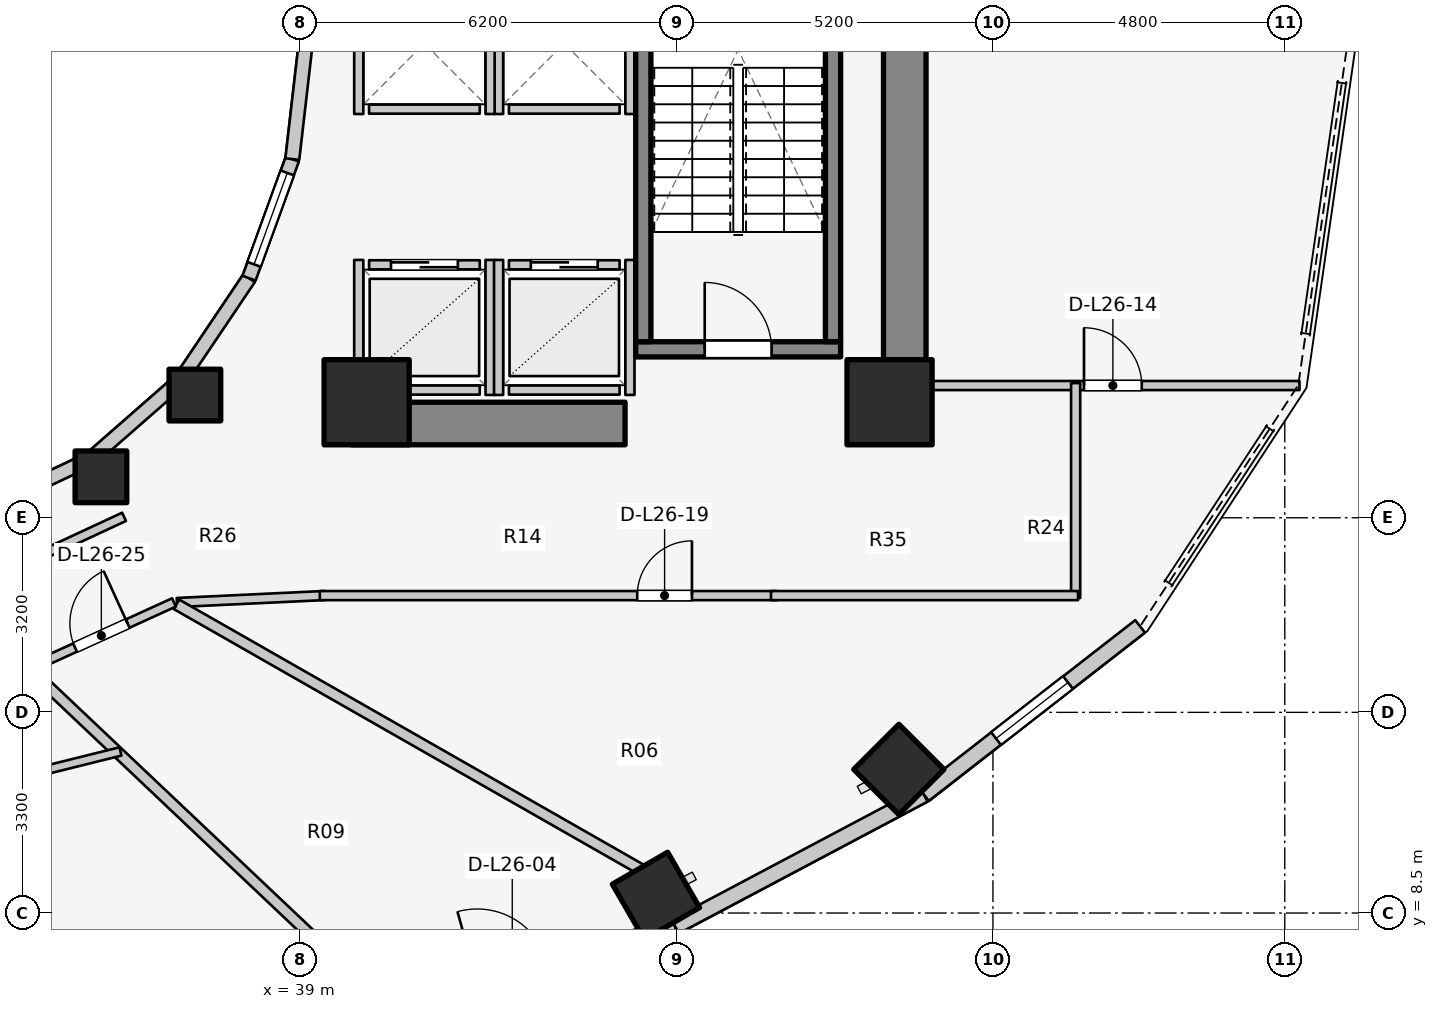
"""IFC4 building model, lengths in metres.
Left out: names, types, materials, properties, quantities, classifications, styles, units other than length and angle.
Written with IfcOpenShell. Run it as: python <this file> out.ifc"""

import sys

from ifc_helpers import new_model, si_unit, direction, frame, frame_2d, origin, origin_2d, place, context, subcontext, project, spatial, rectangle, extrude, element, fill, save


model = new_model("IFC4")
c1 = context("Model", 3, precision=1e-05, world=origin(), true_north=direction((0.0, 1.0)))
c2 = subcontext(c1, "Body", "Model", "MODEL_VIEW")
j1 = project(units=[si_unit("LENGTHUNIT", "METRE"), si_unit("PLANEANGLEUNIT", "RADIAN")], contexts=[c1])
p1 = place(None, origin())
s1 = spatial("IfcSite", under=j1, at=p1, CompositionType="ELEMENT")
p2 = place(p1, origin())
s2 = spatial("IfcBuilding", under=s1, at=p2, CompositionType="ELEMENT")
p3 = place(p2, frame((0.0, 0.0, 88.7)))
s3 = spatial("IfcBuildingStorey", under=s2, at=p3, CompositionType="ELEMENT", Elevation=88.7)
p4 = place(p3, frame((48.95, 17.05, 0.0), z_axis=(0.0, 0.0, 1.0), x_axis=(0.0, 1.0, 0.0)))
e1 = element("IfcWall", 1, at=p4, inside=s3, PredefinedType="SHEAR", context=c2, shape_type="SweptSolid", body=[
    extrude(rectangle(XDim=12.8, YDim=0.7, at=frame_2d((6.4, 0.0))), origin(), (0.0, 0.0, 1.0), 3.1),
])
p5 = place(p3, frame((39.85, 16.55, 0.0), z_axis=(0.0, 0.0, 1.0), x_axis=(1.0, 0.0, 0.0)))
e2 = element("IfcWall", 2, at=p5, inside=s3, PredefinedType="SHEAR", context=c2, shape_type="SweptSolid", body=[
    extrude(rectangle(XDim=4.5, YDim=0.7, at=frame_2d((2.25, 0.0))), origin(), (0.0, 0.0, 1.0), 3.1),
])
p6 = place(p3, frame((44.525, 17.77, 0.0), z_axis=(0.0, 0.0, 1.0), x_axis=(1.0, 0.0, 0.0)))
e3 = element("IfcWall", 3, at=p6, inside=s3, PredefinedType="SOLIDWALL", context=c2, shape_type="SweptSolid", body=[
    extrude(rectangle(XDim=3.37, YDim=0.25, at=frame_2d((1.685, 0.0))), origin(), (0.0, 0.0, 1.0), 3.1),
])
p7 = place(p6, frame((1.135, 0.0, 0.0)))
e4 = element("IfcOpeningElement", 4, at=p7, cuts=e3, PredefinedType="OPENING", context=c2, shape_type="SweptSolid", body=[
    extrude(rectangle(XDim=1.1, YDim=2.1, at=frame_2d((0.55, 1.05))), frame((0.0, 0.135, 0.0), z_axis=(0.0, -1.0, 0.0), x_axis=(1.0, 0.0, 0.0)), (0.0, 0.0, 1.0), 0.27),
])
for number, where, z_axis, x_axis in (
    (5, (44.65, 17.895, 0.0), (0.0, 0.0, 1.0), (0.0, 1.0, 0.0)),
    (6, (47.77, 17.895, 0.0), (0.0, 0.0, 1.0), (0.0, 1.0, 0.0)),
):
    element("IfcWall", number, at=place(p3, frame(where, z_axis=z_axis, x_axis=x_axis)), inside=s3, PredefinedType="SOLIDWALL", context=c2, shape_type="SweptSolid", body=[
        extrude(rectangle(XDim=7.81, YDim=0.25, at=frame_2d((3.905, 0.0))), origin(), (0.0, 0.0, 1.0), 3.1),
    ])
for number, where, z_axis, x_axis in (
    (7, (40.1, 16.9, 0.0), (0.0, 0.0, 1.0), (1.0, 0.0, 0.0)),
    (8, (48.7, 16.9, 0.0), (0.0, 0.0, 1.0), (1.0, 0.0, 0.0)),
):
    element("IfcColumn", number, at=place(p3, frame(where, z_axis=z_axis, x_axis=x_axis)), inside=s3, PredefinedType="COLUMN", context=c2, shape_type="SweptSolid", body=[
        extrude(rectangle(XDim=1.4, YDim=1.4, at=origin_2d()), origin(), (0.0, 0.0, 1.0), 3.1),
    ])
p8 = place(p3, frame((35.73, 15.673, 0.0), z_axis=(0.0, 0.0, 1.0), x_axis=(1.0, 0.0, 0.0)))
e9 = element("IfcColumn", 9, at=p8, inside=s3, PredefinedType="COLUMN", context=c2, shape_type="SweptSolid", body=[
    extrude(rectangle(XDim=0.85, YDim=0.85, at=origin_2d()), origin(), (0.0, 0.0, 1.0), 3.1),
])
p9 = place(p3, frame((44.858, 8.782, 0.0), z_axis=(0.0, 0.0, 1.0), x_axis=(0.5, -0.866025403784, 0.0)))
e10 = element("IfcColumn", 10, at=p9, inside=s3, PredefinedType="COLUMN", context=c2, shape_type="SweptSolid", body=[
    extrude(rectangle(XDim=1.05, YDim=1.05, at=origin_2d()), origin(), (0.0, 0.0, 1.0), 3.1),
])
p10 = place(p3, frame((37.275, 17.018, 0.0), z_axis=(0.0, 0.0, 1.0), x_axis=(1.0, 0.0, 0.0)))
e11 = element("IfcColumn", 11, at=p10, inside=s3, PredefinedType="COLUMN", context=c2, shape_type="SweptSolid", body=[
    extrude(rectangle(XDim=0.85, YDim=0.85, at=origin_2d()), origin(), (0.0, 0.0, 1.0), 3.1),
])
p11 = place(p3, frame((48.853, 10.862, 0.0), z_axis=(0.0, 0.0, 1.0), x_axis=(0.707106781187, -0.707106781187, 0.0)))
e12 = element("IfcColumn", 12, at=p11, inside=s3, PredefinedType="COLUMN", context=c2, shape_type="SweptSolid", body=[
    extrude(rectangle(XDim=1.05, YDim=1.05, at=origin_2d()), origin(), (0.0, 0.0, 1.0), 3.1),
])
p12 = place(p3, frame((33.843, 15.157, 0.0), z_axis=(0.0, 0.0, 1.0), x_axis=(0.904179699603, 0.427152280606, 0.0)))
e13 = element("IfcWall", 13, at=p12, inside=s3, PredefinedType="STANDARD", context=c2, shape_type="SweptSolid", body=[
    extrude(rectangle(XDim=1.899, YDim=0.23, at=frame_2d((0.95, 0.0))), origin(), (0.0, 0.0, 1.0), 2.16),
])
p13 = place(p3, frame((35.56, 15.968, 0.0), z_axis=(0.0, 0.0, 1.0), x_axis=(0.752576694707, 0.658504607869, 0.0)))
e14 = element("IfcWall", 14, at=p13, inside=s3, PredefinedType="STANDARD", context=c2, shape_type="SweptSolid", body=[
    extrude(rectangle(XDim=1.959, YDim=0.23, at=frame_2d((0.98, 0.0))), origin(), (0.0, 0.0, 1.0), 2.16),
])
p14 = place(p3, frame((37.035, 17.258, 0.0), z_axis=(0.0, 0.0, 1.0), x_axis=(0.558197800898, 0.829707909492, 0.0)))
e15 = element("IfcWall", 15, at=p14, inside=s3, PredefinedType="STANDARD", context=c2, shape_type="SweptSolid", body=[
    extrude(rectangle(XDim=2.027, YDim=0.23, at=frame_2d((1.013, 0.0))), origin(), (0.0, 0.0, 1.0), 2.16),
])
p15 = place(p3, frame((38.166, 18.94, 0.0), z_axis=(0.0, 0.0, 1.0), x_axis=(0.341423187295, 0.93990968033, 0.0)))
e16 = element("IfcWall", 16, at=p15, inside=s3, PredefinedType="STANDARD", context=c2, shape_type="SweptSolid", body=[
    extrude(rectangle(XDim=2.084, YDim=0.23, at=frame_2d((1.042, 0.0))), origin(), (0.0, 0.0, 1.0), 2.84),
])
p16 = place(p15, frame((0.242, 0.0, 0.85)))
e17 = element("IfcOpeningElement", 17, at=p16, cuts=e16, PredefinedType="OPENING", context=c2, shape_type="SweptSolid", body=[
    extrude(rectangle(XDim=1.6, YDim=1.65, at=frame_2d((0.8, 0.825))), frame((0.0, 0.125, 0.0), z_axis=(0.0, -1.0, 0.0), x_axis=(1.0, 0.0, 0.0)), (0.0, 0.0, 1.0), 0.25),
])
p17 = place(p3, frame((38.877, 20.898, 0.0), z_axis=(0.0, 0.0, 1.0), x_axis=(0.114711713601, 0.993398823617, 0.0)))
e18 = element("IfcWall", 18, at=p17, inside=s3, PredefinedType="STANDARD", context=c2, shape_type="SweptSolid", body=[
    extrude(rectangle(XDim=2.115, YDim=0.23, at=frame_2d((1.058, 0.0))), origin(), (0.0, 0.0, 1.0), 2.84),
])
p18 = place(p3, frame((39.816, 6.778, 0.0), z_axis=(0.0, 0.0, 1.0), x_axis=(0.962938491413, 0.269721081407, 0.0)))
e19 = element("IfcWall", 19, at=p18, inside=s3, PredefinedType="STANDARD", context=c2, shape_type="SweptSolid", body=[
    extrude(rectangle(XDim=5.563, YDim=0.26, at=frame_2d((2.782, 0.0))), origin(), (0.0, 0.0, 1.0), 2.88),
])
p19 = place(p18, frame((2.182, 0.0, 0.0)))
e20 = element("IfcOpeningElement", 20, at=p19, cuts=e19, PredefinedType="OPENING", context=c2, shape_type="SweptSolid", body=[
    extrude(rectangle(XDim=1.2, YDim=2.2, at=frame_2d((0.6, 1.1))), frame((0.0, 0.14, 0.0), z_axis=(0.0, -1.0, 0.0), x_axis=(1.0, 0.0, 0.0)), (0.0, 0.0, 1.0), 0.28),
])
p20 = place(p3, frame((45.173, 8.279, 0.0), z_axis=(0.0, 0.0, 1.0), x_axis=(0.883668636807, 0.4681129568, 0.0)))
e21 = element("IfcWall", 21, at=p20, inside=s3, PredefinedType="STANDARD", context=c2, shape_type="SweptSolid", body=[
    extrude(rectangle(XDim=4.631, YDim=0.26, at=frame_2d((2.316, 0.0))), origin(), (0.0, 0.0, 1.0), 2.85),
])
p21 = place(p3, frame((49.266, 10.447, 0.0), z_axis=(0.0, 0.0, 1.0), x_axis=(0.789127449954, 0.614229491094, 0.0)))
e22 = element("IfcWall", 22, at=p21, inside=s3, PredefinedType="STANDARD", context=c2, shape_type="SweptSolid", body=[
    extrude(rectangle(XDim=4.505, YDim=0.26, at=frame_2d((2.252, 0.0))), origin(), (0.0, 0.0, 1.0), 2.85),
])
p22 = place(p21, frame((1.502, 0.0, 0.75)))
e23 = element("IfcOpeningElement", 23, at=p22, cuts=e22, PredefinedType="OPENING", context=c2, shape_type="SweptSolid", body=[
    extrude(rectangle(XDim=1.5, YDim=1.6, at=frame_2d((0.75, 0.8))), frame((0.0, 0.14, 0.0), z_axis=(0.0, -1.0, 0.0), x_axis=(1.0, 0.0, 0.0)), (0.0, 0.0, 1.0), 0.28),
])
p23 = place(p3, frame((40.14, 19.16, 0.0), z_axis=(0.0, 0.0, 1.0), x_axis=(1.0, 0.0, 0.0)))
e24 = element("IfcWall", 24, at=p23, inside=s3, PredefinedType="SOLIDWALL", context=c2, shape_type="SweptSolid", body=[
    extrude(rectangle(XDim=1.82, YDim=0.15, at=frame_2d((0.91, 0.0))), origin(), (0.0, 0.0, 1.0), 2.12),
])
p24 = place(p23, frame((0.36, 0.0, 0.0)))
e25 = element("IfcOpeningElement", 25, at=p24, cuts=e24, PredefinedType="OPENING", context=c2, shape_type="SweptSolid", body=[
    extrude(rectangle(XDim=1.1, YDim=2.1, at=frame_2d((0.55, 1.05))), frame((0.0, 0.085, 0.0), z_axis=(0.0, -1.0, 0.0), x_axis=(1.0, 0.0, 0.0)), (0.0, 0.0, 1.0), 0.17),
])
p25 = place(p3, frame((40.14, 17.1, 0.0), z_axis=(0.0, 0.0, 1.0), x_axis=(1.0, 0.0, 0.0)))
e26 = element("IfcWall", 26, at=p25, inside=s3, PredefinedType="SOLIDWALL", context=c2, shape_type="SweptSolid", body=[
    extrude(rectangle(XDim=1.82, YDim=0.15, at=frame_2d((0.91, 0.0))), origin(), (0.0, 0.0, 1.0), 2.12),
])
p26 = place(p3, frame((39.97, 17.02, 0.0), z_axis=(0.0, 0.0, 1.0), x_axis=(0.0, 1.0, 0.0)))
e27 = element("IfcWall", 27, at=p26, inside=s3, PredefinedType="SOLIDWALL", context=c2, shape_type="SweptSolid", body=[
    extrude(rectangle(XDim=2.22, YDim=0.15, at=frame_2d((1.11, 0.0))), origin(), (0.0, 0.0, 1.0), 2.12),
])
p27 = place(p3, frame((42.13, 17.02, 0.0), z_axis=(0.0, 0.0, 1.0), x_axis=(0.0, 1.0, 0.0)))
e28 = element("IfcWall", 28, at=p27, inside=s3, PredefinedType="SOLIDWALL", context=c2, shape_type="SweptSolid", body=[
    extrude(rectangle(XDim=2.22, YDim=0.15, at=frame_2d((1.11, 0.0))), origin(), (0.0, 0.0, 1.0), 2.855),
])
p28 = place(p3, frame((42.44, 19.16, 0.0), z_axis=(0.0, 0.0, 1.0), x_axis=(1.0, 0.0, 0.0)))
e29 = element("IfcWall", 29, at=p28, inside=s3, PredefinedType="SOLIDWALL", context=c2, shape_type="SweptSolid", body=[
    extrude(rectangle(XDim=1.82, YDim=0.15, at=frame_2d((0.91, 0.0))), origin(), (0.0, 0.0, 1.0), 2.855),
])
p29 = place(p28, frame((0.36, 0.0, 0.0)))
e30 = element("IfcOpeningElement", 30, at=p29, cuts=e29, PredefinedType="OPENING", context=c2, shape_type="SweptSolid", body=[
    extrude(rectangle(XDim=1.1, YDim=2.1, at=frame_2d((0.55, 1.05))), frame((0.0, 0.085, 0.0), z_axis=(0.0, -1.0, 0.0), x_axis=(1.0, 0.0, 0.0)), (0.0, 0.0, 1.0), 0.17),
])
p30 = place(p3, frame((42.44, 17.1, 0.0), z_axis=(0.0, 0.0, 1.0), x_axis=(1.0, 0.0, 0.0)))
e31 = element("IfcWall", 31, at=p30, inside=s3, PredefinedType="SOLIDWALL", context=c2, shape_type="SweptSolid", body=[
    extrude(rectangle(XDim=1.82, YDim=0.15, at=frame_2d((0.91, 0.0))), origin(), (0.0, 0.0, 1.0), 2.855),
])
p31 = place(p3, frame((42.27, 17.02, 0.0), z_axis=(0.0, 0.0, 1.0), x_axis=(0.0, 1.0, 0.0)))
e32 = element("IfcWall", 32, at=p31, inside=s3, PredefinedType="SOLIDWALL", context=c2, shape_type="SweptSolid", body=[
    extrude(rectangle(XDim=2.22, YDim=0.15, at=frame_2d((1.11, 0.0))), origin(), (0.0, 0.0, 1.0), 2.855),
])
p32 = place(p3, frame((44.43, 17.02, 0.0), z_axis=(0.0, 0.0, 1.0), x_axis=(0.0, 1.0, 0.0)))
e33 = element("IfcWall", 33, at=p32, inside=s3, PredefinedType="SOLIDWALL", context=c2, shape_type="SweptSolid", body=[
    extrude(rectangle(XDim=2.22, YDim=0.15, at=frame_2d((1.11, 0.0))), origin(), (0.0, 0.0, 1.0), 2.12),
])
p33 = place(p3, frame((42.44, 21.72, 0.0), z_axis=(0.0, 0.0, 1.0), x_axis=(1.0, 0.0, 0.0)))
e34 = element("IfcWall", 34, at=p33, inside=s3, PredefinedType="SOLIDWALL", context=c2, shape_type="SweptSolid", body=[
    extrude(rectangle(XDim=1.82, YDim=0.15, at=frame_2d((0.91, 0.0))), origin(), (0.0, 0.0, 1.0), 2.855),
])
for number, where, z_axis, x_axis in (
    (35, (42.27, 21.64, 0.0), (0.0, 0.0, 1.0), (0.0, 1.0, 0.0)),
    (36, (44.43, 21.64, 0.0), (0.0, 0.0, 1.0), (0.0, 1.0, 0.0)),
):
    element("IfcWall", number, at=place(p3, frame(where, z_axis=z_axis, x_axis=x_axis)), inside=s3, PredefinedType="SOLIDWALL", context=c2, shape_type="SweptSolid", body=[
        extrude(rectangle(XDim=2.32, YDim=0.15, at=frame_2d((1.16, 0.0))), origin(), (0.0, 0.0, 1.0), 2.855),
    ])
p34 = place(p3, frame((40.14, 21.72, 0.0), z_axis=(0.0, 0.0, 1.0), x_axis=(1.0, 0.0, 0.0)))
e37 = element("IfcWall", 37, at=p34, inside=s3, PredefinedType="SOLIDWALL", context=c2, shape_type="SweptSolid", body=[
    extrude(rectangle(XDim=1.82, YDim=0.15, at=frame_2d((0.91, 0.0))), origin(), (0.0, 0.0, 1.0), 2.12),
])
p35 = place(p3, frame((39.97, 21.64, 0.0), z_axis=(0.0, 0.0, 1.0), x_axis=(0.0, 1.0, 0.0)))
e38 = element("IfcWall", 38, at=p35, inside=s3, PredefinedType="SOLIDWALL", context=c2, shape_type="SweptSolid", body=[
    extrude(rectangle(XDim=2.32, YDim=0.15, at=frame_2d((1.16, 0.0))), origin(), (0.0, 0.0, 1.0), 2.12),
])
p36 = place(p3, frame((42.13, 21.64, 0.0), z_axis=(0.0, 0.0, 1.0), x_axis=(0.0, 1.0, 0.0)))
e39 = element("IfcWall", 39, at=p36, inside=s3, PredefinedType="SOLIDWALL", context=c2, shape_type="SweptSolid", body=[
    extrude(rectangle(XDim=2.32, YDim=0.15, at=frame_2d((1.16, 0.0))), origin(), (0.0, 0.0, 1.0), 2.855),
])
p37 = place(p3, frame((34.127, 14.094, 0.0), z_axis=(0.0, 0.0, 1.0), x_axis=(0.906943449489, 0.421252393975, 0.0)))
e40 = element("IfcWall", 40, at=p37, inside=s3, PredefinedType="PARTITIONING", context=c2, shape_type="SweptSolid", body=[
    extrude(rectangle(XDim=2.186, YDim=0.15, at=frame_2d((1.093, 0.0))), origin(), (0.0, 0.0, 1.0), 2.272),
])
p38 = place(p3, frame((48.95, 17.175, 0.0), z_axis=(0.0, 0.0, 1.0), x_axis=(1.0, 0.0, 0.0)))
e41 = element("IfcWall", 41, at=p38, inside=s3, PredefinedType="PARTITIONING", context=c2, shape_type="SweptSolid", body=[
    extrude(rectangle(XDim=6.492, YDim=0.15, at=frame_2d((3.246, 0.0))), origin(), (0.0, 0.0, 1.0), 2.855),
])
p39 = place(p38, frame((2.948, 0.0, 0.0)))
e42 = element("IfcOpeningElement", 42, at=p39, cuts=e41, PredefinedType="OPENING", context=c2, shape_type="SweptSolid", body=[
    extrude(rectangle(XDim=0.95, YDim=2.1, at=frame_2d((0.475, 1.05))), frame((0.0, 0.085, 0.0), z_axis=(0.0, -1.0, 0.0), x_axis=(1.0, 0.0, 0.0)), (0.0, 0.0, 1.0), 0.17),
])
p40 = place(p3, frame((51.76, 13.68, 0.0), z_axis=(0.0, 0.0, 1.0), x_axis=(0.0, 1.0, 0.0)))
e43 = element("IfcWall", 43, at=p40, inside=s3, PredefinedType="PARTITIONING", context=c2, shape_type="SweptSolid", body=[
    extrude(rectangle(XDim=3.535, YDim=0.15, at=frame_2d((1.768, 0.0))), origin(), (0.0, 0.0, 1.0), 2.855),
])
p41 = place(p3, frame((36.98, 13.606, 0.0), z_axis=(0.0, 0.0, 1.0), x_axis=(0.998877427952, 0.047369651964, 0.0)))
e44 = element("IfcWall", 44, at=p41, inside=s3, PredefinedType="PARTITIONING", context=c2, shape_type="SweptSolid", body=[
    extrude(rectangle(XDim=2.433, YDim=0.15, at=frame_2d((1.216, 0.0))), origin(), (0.0, 0.0, 1.0), 2.272),
])
p42 = place(p3, frame((39.33, 13.72, 0.0), z_axis=(0.0, 0.0, 1.0), x_axis=(1.0, 0.0, 0.0)))
e45 = element("IfcWall", 45, at=p42, inside=s3, PredefinedType="PARTITIONING", context=c2, shape_type="SweptSolid", body=[
    extrude(rectangle(XDim=7.52, YDim=0.15, at=frame_2d((3.76, 0.0))), origin(), (0.0, 0.0, 1.0), 2.272),
])
p43 = place(p42, frame((5.22, 0.0, 0.0)))
e46 = element("IfcOpeningElement", 46, at=p43, cuts=e45, PredefinedType="OPENING", context=c2, shape_type="SweptSolid", body=[
    extrude(rectangle(XDim=0.9, YDim=2.1, at=frame_2d((0.45, 1.05))), frame((0.0, 0.085, 0.0), z_axis=(0.0, -1.0, 0.0), x_axis=(1.0, 0.0, 0.0)), (0.0, 0.0, 1.0), 0.17),
])
p44 = place(p3, frame((46.75, 13.72, 0.0), z_axis=(0.0, 0.0, 1.0), x_axis=(1.0, 0.0, 0.0)))
e47 = element("IfcWall", 47, at=p44, inside=s3, PredefinedType="PARTITIONING", context=c2, shape_type="SweptSolid", body=[
    extrude(rectangle(XDim=5.05, YDim=0.15, at=frame_2d((2.525, 0.0))), origin(), (0.0, 0.0, 1.0), 2.142),
])
p45 = place(p3, frame((34.589, 12.482, 0.0), z_axis=(0.0, 0.0, 1.0), x_axis=(0.726306601605, -0.687370875485, 0.0)))
e48 = element("IfcWall", 48, at=p45, inside=s3, PredefinedType="PARTITIONING", context=c2, shape_type="SweptSolid", body=[
    extrude(rectangle(XDim=6.76, YDim=0.18, at=frame_2d((3.38, 0.0))), origin(), (0.0, 0.0, 1.0), 2.272),
])
p46 = place(p3, frame((36.973, 13.576, 0.0), z_axis=(0.0, 0.0, 1.0), x_axis=(0.868484076301, -0.495717065685, 0.0)))
e49 = element("IfcWall", 49, at=p46, inside=s3, PredefinedType="PARTITIONING", context=c2, shape_type="SweptSolid", body=[
    extrude(rectangle(XDim=8.789, YDim=0.18, at=frame_2d((4.394, 0.0))), origin(), (0.0, 0.0, 1.0), 2.272),
])
p47 = place(p3, frame((31.951, 10.138, 0.0), z_axis=(0.0, 0.0, 1.0), x_axis=(0.970461257599, 0.241257015439, 0.0)))
e50 = element("IfcWall", 50, at=p47, inside=s3, PredefinedType="PLUMBINGWALL", context=c2, shape_type="SweptSolid", body=[
    extrude(rectangle(XDim=4.224, YDim=0.14, at=frame_2d((2.112, 0.0))), origin(), (0.0, 0.0, 1.0), 2.272),
])
p48 = place(p47, frame((1.662, 0.0, 0.0)))
e51 = element("IfcOpeningElement", 51, at=p48, cuts=e50, PredefinedType="OPENING", context=c2, shape_type="SweptSolid", body=[
    extrude(rectangle(XDim=0.9, YDim=2.1, at=frame_2d((0.45, 1.05))), frame((0.0, 0.08, 0.0), z_axis=(0.0, -1.0, 0.0), x_axis=(1.0, 0.0, 0.0)), (0.0, 0.0, 1.0), 0.16),
])
p49 = place(p3, frame((34.543, 12.518, 0.0), z_axis=(0.0, 0.0, 1.0), x_axis=(0.909747571199, 0.415161843982, 0.0)))
e52 = element("IfcWall", 52, at=p49, inside=s3, PredefinedType="PARTITIONING", context=c2, shape_type="SweptSolid", body=[
    extrude(rectangle(XDim=2.625, YDim=0.15, at=frame_2d((1.312, 0.0))), origin(), (0.0, 0.0, 1.0), 2.272),
])
p50 = place(p49, frame((0.838, 0.0, 0.0)))
e53 = element("IfcOpeningElement", 53, at=p50, cuts=e52, PredefinedType="OPENING", context=c2, shape_type="SweptSolid", body=[
    extrude(rectangle(XDim=0.95, YDim=2.1, at=frame_2d((0.475, 1.05))), frame((0.0, 0.085, 0.0), z_axis=(0.0, -1.0, 0.0), x_axis=(1.0, 0.0, 0.0)), (0.0, 0.0, 1.0), 0.17),
])
p51 = place(p16, origin())
e54 = element("IfcWindow", 54, at=p51, inside=s3, PartitioningType="SINGLE_PANEL", PredefinedType="WINDOW", context=c2, shape_type="SweptSolid", body=[
    extrude(rectangle(XDim=1.6, YDim=1.65, at=frame_2d((0.8, 0.825))), frame((0.0, 0.03, 0.0), z_axis=(0.0, -1.0, 0.0), x_axis=(1.0, 0.0, 0.0)), (0.0, 0.0, 1.0), 0.06),
])
fill(e17, e54)
p52 = place(p22, origin())
e55 = element("IfcWindow", 55, at=p52, inside=s3, PartitioningType="SINGLE_PANEL", PredefinedType="WINDOW", context=c2, shape_type="SweptSolid", body=[
    extrude(rectangle(XDim=1.5, YDim=1.6, at=frame_2d((0.75, 0.8))), frame((0.0, 0.03, 0.0), z_axis=(0.0, -1.0, 0.0), x_axis=(1.0, 0.0, 0.0)), (0.0, 0.0, 1.0), 0.06),
])
fill(e23, e55)
p53 = place(p7, origin())
e56 = element("IfcDoor", 56, at=p53, inside=s3, OperationType="SINGLE_SWING_LEFT", PredefinedType="DOOR", context=c2, shape_type="SweptSolid", body=[
    extrude(rectangle(XDim=1.1, YDim=2.1, at=frame_2d((0.55, 1.05))), frame((0.0, 0.025, 0.0), z_axis=(0.0, -1.0, 0.0), x_axis=(1.0, 0.0, 0.0)), (0.0, 0.0, 1.0), 0.05),
])
fill(e4, e56)
p54 = place(p24, origin())
e57 = element("IfcDoor", 57, at=p54, inside=s3, OperationType="DOUBLE_DOOR_SLIDING", PredefinedType="DOOR", context=c2, shape_type="SweptSolid", body=[
    extrude(rectangle(XDim=1.1, YDim=2.1, at=frame_2d((0.55, 1.05))), frame((0.0, 0.025, 0.0), z_axis=(0.0, -1.0, 0.0), x_axis=(1.0, 0.0, 0.0)), (0.0, 0.0, 1.0), 0.05),
])
fill(e25, e57)
p55 = place(p29, origin())
e58 = element("IfcDoor", 58, at=p55, inside=s3, OperationType="DOUBLE_DOOR_SLIDING", PredefinedType="DOOR", context=c2, shape_type="SweptSolid", body=[
    extrude(rectangle(XDim=1.1, YDim=2.1, at=frame_2d((0.55, 1.05))), frame((0.0, 0.025, 0.0), z_axis=(0.0, -1.0, 0.0), x_axis=(1.0, 0.0, 0.0)), (0.0, 0.0, 1.0), 0.05),
])
fill(e30, e58)
p56 = place(p39, origin())
e59 = element("IfcDoor", 59, at=p56, inside=s3, OperationType="SINGLE_SWING_LEFT", PredefinedType="DOOR", context=c2, shape_type="SweptSolid", body=[
    extrude(rectangle(XDim=0.95, YDim=2.1, at=frame_2d((0.475, 1.05))), frame((0.0, 0.025, 0.0), z_axis=(0.0, -1.0, 0.0), x_axis=(1.0, 0.0, 0.0)), (0.0, 0.0, 1.0), 0.05),
])
fill(e42, e59)
p57 = place(p43, origin())
e60 = element("IfcDoor", 60, at=p57, inside=s3, OperationType="SINGLE_SWING_RIGHT", PredefinedType="DOOR", context=c2, shape_type="SweptSolid", body=[
    extrude(rectangle(XDim=0.9, YDim=2.1, at=frame_2d((0.45, 1.05))), frame((0.0, 0.025, 0.0), z_axis=(0.0, -1.0, 0.0), x_axis=(1.0, 0.0, 0.0)), (0.0, 0.0, 1.0), 0.05),
])
fill(e46, e60)
p58 = place(p50, origin())
e61 = element("IfcDoor", 61, at=p58, inside=s3, OperationType="SINGLE_SWING_RIGHT", PredefinedType="DOOR", context=c2, shape_type="SweptSolid", body=[
    extrude(rectangle(XDim=0.95, YDim=2.1, at=frame_2d((0.475, 1.05))), frame((0.0, 0.025, 0.0), z_axis=(0.0, -1.0, 0.0), x_axis=(1.0, 0.0, 0.0)), (0.0, 0.0, 1.0), 0.05),
])
fill(e53, e61)
save(model, sys.argv[1])
